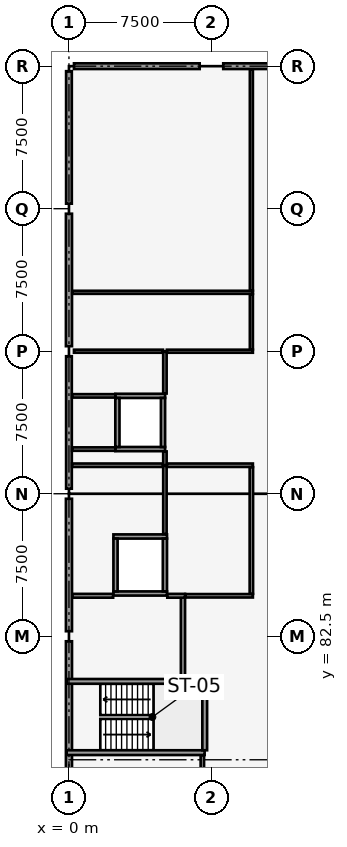
"""IFC4 building model, lengths in metres.
Left out: names, types, materials, properties, quantities, classifications, styles, units other than length and angle.
Written with IfcOpenShell. Run it as: python <this file> out.ifc"""

import sys

from ifc_helpers import new_model, si_unit, direction, frame, frame_2d, origin, origin_2d, place, context, subcontext, project, spatial, rectangle, extrude, element, fill, save


model = new_model("IFC4")
c1 = context("Model", 3, precision=1e-05, world=origin(), true_north=direction((0.0, 1.0)))
c2 = subcontext(c1, "Body", "Model", "MODEL_VIEW")
j1 = project(units=[si_unit("LENGTHUNIT", "METRE"), si_unit("PLANEANGLEUNIT", "RADIAN")], contexts=[c1])
p1 = place(None, origin())
s1 = spatial("IfcSite", under=j1, at=p1, CompositionType="ELEMENT")
p2 = place(p1, origin())
s2 = spatial("IfcBuilding", under=s1, at=p2, CompositionType="ELEMENT")
p3 = place(p2, frame((0.0, 0.0, 17.1)))
s3 = spatial("IfcBuildingStorey", under=s2, at=p3, CompositionType="ELEMENT", Elevation=17.1)
for number, where, z_axis, x_axis in (
    (1, (0.0, 82.5, 0.0), (0.0, 0.0, 1.0), (1.0, 0.0, 0.0)),
    (2, (0.0, 90.0, 0.0), (0.0, 0.0, 1.0), (1.0, 0.0, 0.0)),
    (3, (0.0, 97.5, 0.0), (0.0, 0.0, 1.0), (1.0, 0.0, 0.0)),
    (4, (0.0, 105.0, 0.0), (0.0, 0.0, 1.0), (1.0, 0.0, 0.0)),
    (5, (0.0, 112.5, 0.0), (0.0, 0.0, 1.0), (1.0, 0.0, 0.0)),
):
    element("IfcColumn", number, at=place(p3, frame(where, z_axis=z_axis, x_axis=x_axis)), inside=s3, PredefinedType="COLUMN", context=c2, shape_type="SweptSolid", body=[
        extrude(rectangle(XDim=0.5, YDim=0.5, at=origin_2d()), origin(), (0.0, 0.0, 1.0), 3.9),
    ])
p4 = place(p3, frame((0.265, 112.5, 0.0), z_axis=(0.0, 0.0, 1.0), x_axis=(1.0, 0.0, 0.0)))
e6 = element("IfcWall", 6, at=p4, inside=s3, PredefinedType="SOLIDWALL", context=c2, shape_type="SweptSolid", body=[
    extrude(rectangle(XDim=6.615, YDim=0.3, at=frame_2d((3.308, 0.0))), origin(), (0.0, 0.0, 1.0), 2.59),
])
p5 = place(p4, frame((2.91, 0.0, 0.6)))
e7 = element("IfcOpeningElement", 7, at=p5, cuts=e6, PredefinedType="OPENING", context=c2, shape_type="SweptSolid", body=[
    extrude(rectangle(XDim=1.15, YDim=1.3, at=frame_2d((0.575, 0.65))), frame((0.0, 0.16, 0.0), z_axis=(0.0, -1.0, 0.0), x_axis=(1.0, 0.0, 0.0)), (0.0, 0.0, 1.0), 0.32),
])
p6 = place(p3, frame((8.12, 112.5, 0.0), z_axis=(0.0, 0.0, 1.0), x_axis=(1.0, 0.0, 0.0)))
e8 = element("IfcWall", 8, at=p6, inside=s3, PredefinedType="SOLIDWALL", context=c2, shape_type="SweptSolid", body=[
    extrude(rectangle(XDim=6.615, YDim=0.3, at=frame_2d((3.308, 0.0))), origin(), (0.0, 0.0, 1.0), 2.59),
])
p7 = place(p6, frame((2.48, 0.0, 0.6)))
e9 = element("IfcOpeningElement", 9, at=p7, cuts=e8, PredefinedType="OPENING", context=c2, shape_type="SweptSolid", body=[
    extrude(rectangle(XDim=1.3, YDim=1.3, at=frame_2d((0.65, 0.65))), frame((0.0, 0.16, 0.0), z_axis=(0.0, -1.0, 0.0), x_axis=(1.0, 0.0, 0.0)), (0.0, 0.0, 1.0), 0.32),
])
for number, where, z_axis, x_axis in (
    (10, (0.0, 75.265, 0.0), (0.0, 0.0, 1.0), (0.0, 1.0, 0.0)),
    (11, (0.0, 82.765, 0.0), (0.0, 0.0, 1.0), (0.0, 1.0, 0.0)),
):
    element("IfcWall", number, at=place(p3, frame(where, z_axis=z_axis, x_axis=x_axis)), inside=s3, PredefinedType="SOLIDWALL", context=c2, shape_type="SweptSolid", body=[
        extrude(rectangle(XDim=6.97, YDim=0.32, at=frame_2d((3.485, 0.0))), origin(), (0.0, 0.0, 1.0), 2.59),
    ])
p8 = place(p3, frame((0.0, 90.265, 0.0), z_axis=(0.0, 0.0, 1.0), x_axis=(0.0, 1.0, 0.0)))
e12 = element("IfcWall", 12, at=p8, inside=s3, PredefinedType="SOLIDWALL", context=c2, shape_type="SweptSolid", body=[
    extrude(rectangle(XDim=6.97, YDim=0.3, at=frame_2d((3.485, 0.0))), origin(), (0.0, 0.0, 1.0), 2.59),
])
p9 = place(p3, frame((0.0, 97.765, 0.0), z_axis=(0.0, 0.0, 1.0), x_axis=(0.0, 1.0, 0.0)))
e13 = element("IfcWall", 13, at=p9, inside=s3, PredefinedType="SOLIDWALL", context=c2, shape_type="SweptSolid", body=[
    extrude(rectangle(XDim=6.97, YDim=0.32, at=frame_2d((3.485, 0.0))), origin(), (0.0, 0.0, 1.0), 2.59),
])
p10 = place(p3, frame((0.0, 105.265, 0.0), z_axis=(0.0, 0.0, 1.0), x_axis=(0.0, 1.0, 0.0)))
e14 = element("IfcWall", 14, at=p10, inside=s3, PredefinedType="SOLIDWALL", context=c2, shape_type="SweptSolid", body=[
    extrude(rectangle(XDim=6.97, YDim=0.3, at=frame_2d((3.485, 0.0))), origin(), (0.0, 0.0, 1.0), 2.59),
])
p11 = place(p10, frame((1.32, 0.0, 0.6)))
e15 = element("IfcOpeningElement", 15, at=p11, cuts=e14, PredefinedType="OPENING", context=c2, shape_type="SweptSolid", body=[
    extrude(rectangle(XDim=1.2, YDim=1.2, at=frame_2d((0.6, 0.6))), frame((0.0, 0.16, 0.0), z_axis=(0.0, -1.0, 0.0), x_axis=(1.0, 0.0, 0.0)), (0.0, 0.0, 1.0), 0.32),
])
p12 = place(p10, frame((4.375, 0.0, 0.6)))
e16 = element("IfcOpeningElement", 16, at=p12, cuts=e14, PredefinedType="OPENING", context=c2, shape_type="SweptSolid", body=[
    extrude(rectangle(XDim=1.35, YDim=1.15, at=frame_2d((0.675, 0.575))), frame((0.0, 0.16, 0.0), z_axis=(0.0, -1.0, 0.0), x_axis=(1.0, 0.0, 0.0)), (0.0, 0.0, 1.0), 0.32),
])
p13 = place(p3, frame((-0.12, 76.375, 0.0), z_axis=(0.0, 0.0, 1.0), x_axis=(1.0, 0.0, 0.0)))
e17 = element("IfcWall", 17, at=p13, inside=s3, PredefinedType="SOLIDWALL", context=c2, shape_type="SweptSolid", body=[
    extrude(rectangle(XDim=7.26, YDim=0.25, at=frame_2d((3.63, 0.0))), origin(), (0.0, 0.0, 1.0), 3.62),
])
p14 = place(p3, frame((-0.12, 80.125, 0.0), z_axis=(0.0, 0.0, 1.0), x_axis=(1.0, 0.0, 0.0)))
e18 = element("IfcWall", 18, at=p14, inside=s3, PredefinedType="SOLIDWALL", context=c2, shape_type="SweptSolid", body=[
    extrude(rectangle(XDim=7.26, YDim=0.25, at=frame_2d((3.63, 0.0))), origin(), (0.0, 0.0, 1.0), 3.62),
])
p15 = place(p14, frame((0.45, 0.0, 0.0)))
e19 = element("IfcOpeningElement", 19, at=p15, cuts=e18, PredefinedType="OPENING", context=c2, shape_type="SweptSolid", body=[
    extrude(rectangle(XDim=1.1, YDim=2.15, at=frame_2d((0.55, 1.075))), frame((0.0, 0.135, 0.0), z_axis=(0.0, -1.0, 0.0), x_axis=(1.0, 0.0, 0.0)), (0.0, 0.0, 1.0), 0.27),
])
p16 = place(p3, frame((7.145, 76.5, 0.0), z_axis=(0.0, 0.0, 1.0), x_axis=(0.0, 1.0, 0.0)))
e20 = element("IfcWall", 20, at=p16, inside=s3, PredefinedType="SOLIDWALL", context=c2, shape_type="SweptSolid", body=[
    extrude(rectangle(XDim=3.5, YDim=0.25, at=frame_2d((1.75, 0.0))), origin(), (0.0, 0.0, 1.0), 3.62),
])
for number, where, z_axis, x_axis in (
    (21, (2.44, 92.35, 0.0), (0.0, 0.0, 1.0), (1.0, 0.0, 0.0)),
    (22, (2.44, 95.15, 0.0), (0.0, 0.0, 1.0), (1.0, 0.0, 0.0)),
):
    element("IfcWall", number, at=place(p3, frame(where, z_axis=z_axis, x_axis=x_axis)), inside=s3, PredefinedType="SOLIDWALL", context=c2, shape_type="SweptSolid", body=[
        extrude(rectangle(XDim=2.62, YDim=0.22, at=frame_2d((1.31, 0.0))), origin(), (0.0, 0.0, 1.0), 3.62),
    ])
p17 = place(p3, frame((2.55, 92.46, 0.0), z_axis=(0.0, 0.0, 1.0), x_axis=(0.0, 1.0, 0.0)))
e23 = element("IfcWall", 23, at=p17, inside=s3, PredefinedType="SOLIDWALL", context=c2, shape_type="SweptSolid", body=[
    extrude(rectangle(XDim=2.58, YDim=0.22, at=frame_2d((1.29, 0.0))), origin(), (0.0, 0.0, 1.0), 3.62),
])
p18 = place(p3, frame((4.95, 92.46, 0.0), z_axis=(0.0, 0.0, 1.0), x_axis=(0.0, 1.0, 0.0)))
e24 = element("IfcWall", 24, at=p18, inside=s3, PredefinedType="SOLIDWALL", context=c2, shape_type="SweptSolid", body=[
    extrude(rectangle(XDim=2.58, YDim=0.22, at=frame_2d((1.29, 0.0))), origin(), (0.0, 0.0, 1.0), 3.62),
])
p19 = place(p18, frame((0.79, 0.0, 0.0)))
e25 = element("IfcOpeningElement", 25, at=p19, cuts=e24, PredefinedType="OPENING", context=c2, shape_type="SweptSolid", body=[
    extrude(rectangle(XDim=1.0, YDim=2.15, at=frame_2d((0.5, 1.075))), frame((0.0, 0.12, 0.0), z_axis=(0.0, -1.0, 0.0), x_axis=(1.0, 0.0, 0.0)), (0.0, 0.0, 1.0), 0.24),
])
p20 = place(p3, frame((2.34, 84.75, 0.0), z_axis=(0.0, 0.0, 1.0), x_axis=(1.0, 0.0, 0.0)))
e26 = element("IfcWall", 26, at=p20, inside=s3, PredefinedType="SOLIDWALL", context=c2, shape_type="SweptSolid", body=[
    extrude(rectangle(XDim=2.82, YDim=0.22, at=frame_2d((1.41, 0.0))), origin(), (0.0, 0.0, 1.0), 3.62),
])
p21 = place(p20, frame((0.86, 0.0, 0.0)))
e27 = element("IfcOpeningElement", 27, at=p21, cuts=e26, PredefinedType="OPENING", context=c2, shape_type="SweptSolid", body=[
    extrude(rectangle(XDim=1.1, YDim=2.15, at=frame_2d((0.55, 1.075))), frame((0.0, 0.12, 0.0), z_axis=(0.0, -1.0, 0.0), x_axis=(1.0, 0.0, 0.0)), (0.0, 0.0, 1.0), 0.24),
])
p22 = place(p3, frame((2.34, 87.75, 0.0), z_axis=(0.0, 0.0, 1.0), x_axis=(1.0, 0.0, 0.0)))
e28 = element("IfcWall", 28, at=p22, inside=s3, PredefinedType="SOLIDWALL", context=c2, shape_type="SweptSolid", body=[
    extrude(rectangle(XDim=2.82, YDim=0.22, at=frame_2d((1.41, 0.0))), origin(), (0.0, 0.0, 1.0), 3.62),
])
for number, where, z_axis, x_axis in (
    (29, (2.45, 84.86, 0.0), (0.0, 0.0, 1.0), (0.0, 1.0, 0.0)),
    (30, (5.05, 84.86, 0.0), (0.0, 0.0, 1.0), (0.0, 1.0, 0.0)),
):
    element("IfcWall", number, at=place(p3, frame(where, z_axis=z_axis, x_axis=x_axis)), inside=s3, PredefinedType="SOLIDWALL", context=c2, shape_type="SweptSolid", body=[
        extrude(rectangle(XDim=2.78, YDim=0.22, at=frame_2d((1.39, 0.0))), origin(), (0.0, 0.0, 1.0), 3.62),
    ])
p23 = place(p3, frame((6.0, 80.26, 0.0), z_axis=(0.0, 0.0, 1.0), x_axis=(0.0, 1.0, 0.0)))
e31 = element("IfcWall", 31, at=p23, inside=s3, PredefinedType="SOLIDWALL", context=c2, shape_type="SweptSolid", body=[
    extrude(rectangle(XDim=4.37, YDim=0.22, at=frame_2d((2.185, 0.0))), origin(), (0.0, 0.0, 1.0), 3.62),
])
p24 = place(p23, frame((0.45, 0.0, 0.0)))
e32 = element("IfcOpeningElement", 32, at=p24, cuts=e31, PredefinedType="OPENING", context=c2, shape_type="SweptSolid", body=[
    extrude(rectangle(XDim=1.1, YDim=2.15, at=frame_2d((0.55, 1.075))), frame((0.0, 0.12, 0.0), z_axis=(0.0, -1.0, 0.0), x_axis=(1.0, 0.0, 0.0)), (0.0, 0.0, 1.0), 0.24),
])
p25 = place(p3, frame((0.18, 84.63, 0.0), z_axis=(0.0, 0.0, 1.0), x_axis=(1.0, 0.0, 0.0)))
e33 = element("IfcWall", 33, at=p25, inside=s3, PredefinedType="PARTITIONING", context=c2, shape_type="SweptSolid", body=[
    extrude(rectangle(XDim=2.145, YDim=0.2, at=frame_2d((1.073, 0.0))), origin(), (0.0, 0.0, 1.0), 2.85),
])
p26 = place(p3, frame((5.175, 84.63, 0.0), z_axis=(0.0, 0.0, 1.0), x_axis=(1.0, 0.0, 0.0)))
e34 = element("IfcWall", 34, at=p26, inside=s3, PredefinedType="PARTITIONING", context=c2, shape_type="SweptSolid", body=[
    extrude(rectangle(XDim=0.935, YDim=0.2, at=frame_2d((0.468, 0.0))), origin(), (0.0, 0.0, 1.0), 3.2),
])
p27 = place(p3, frame((7.02, 75.0, 0.0), z_axis=(0.0, 0.0, 1.0), x_axis=(0.0, 1.0, 0.0)))
e35 = element("IfcWall", 35, at=p27, inside=s3, PredefinedType="PARTITIONING", context=c2, shape_type="SweptSolid", body=[
    extrude(rectangle(XDim=1.236, YDim=0.18, at=frame_2d((0.618, 0.0))), origin(), (0.0, 0.0, 1.0), 2.59),
])
p28 = place(p3, frame((5.05, 87.874, 0.0), z_axis=(0.0, 0.0, 1.0), x_axis=(0.0, 1.0, 0.0)))
e36 = element("IfcWall", 36, at=p28, inside=s3, PredefinedType="PARTITIONING", context=c2, shape_type="SweptSolid", body=[
    extrude(rectangle(XDim=3.626, YDim=0.18, at=frame_2d((1.813, 0.0))), origin(), (0.0, 0.0, 1.0), 2.59),
])
p29 = place(p3, frame((6.124, 84.63, 0.0), z_axis=(0.0, 0.0, 1.0), x_axis=(1.0, 0.0, 0.0)))
e37 = element("IfcWall", 37, at=p29, inside=s3, PredefinedType="PARTITIONING", context=c2, shape_type="SweptSolid", body=[
    extrude(rectangle(XDim=3.556, YDim=0.18, at=frame_2d((1.778, 0.0))), origin(), (0.0, 0.0, 1.0), 2.97),
])
p30 = place(p3, frame((0.164, 91.5, 0.0), z_axis=(0.0, 0.0, 1.0), x_axis=(1.0, 0.0, 0.0)))
e38 = element("IfcWall", 38, at=p30, inside=s3, PredefinedType="PARTITIONING", context=c2, shape_type="SweptSolid", body=[
    extrude(rectangle(XDim=4.782, YDim=0.18, at=frame_2d((2.391, 0.0))), origin(), (0.0, 0.0, 1.0), 2.84),
])
p31 = place(p3, frame((5.154, 91.5, 0.0), z_axis=(0.0, 0.0, 1.0), x_axis=(1.0, 0.0, 0.0)))
e39 = element("IfcWall", 39, at=p31, inside=s3, PredefinedType="PARTITIONING", context=c2, shape_type="SweptSolid", body=[
    extrude(rectangle(XDim=4.526, YDim=0.18, at=frame_2d((2.263, 0.0))), origin(), (0.0, 0.0, 1.0), 2.97),
])
p32 = place(p3, frame((9.6, 84.734, 0.0), z_axis=(0.0, 0.0, 1.0), x_axis=(0.0, 1.0, 0.0)))
e40 = element("IfcWall", 40, at=p32, inside=s3, PredefinedType="PARTITIONING", context=c2, shape_type="SweptSolid", body=[
    extrude(rectangle(XDim=6.662, YDim=0.18, at=frame_2d((3.331, 0.0))), origin(), (0.0, 0.0, 1.0), 2.59),
])
p33 = place(p32, frame((2.241, 0.0, 0.0)))
e41 = element("IfcOpeningElement", 41, at=p33, cuts=e40, PredefinedType="OPENING", context=c2, shape_type="SweptSolid", body=[
    extrude(rectangle(XDim=1.05, YDim=2.12, at=frame_2d((0.525, 1.06))), frame((0.0, 0.1, 0.0), z_axis=(0.0, -1.0, 0.0), x_axis=(1.0, 0.0, 0.0)), (0.0, 0.0, 1.0), 0.2),
])
for number, where, z_axis, x_axis in (
    (42, (0.164, 92.35, 0.0), (0.0, 0.0, 1.0), (1.0, 0.0, 0.0)),
    (43, (0.164, 95.15, 0.0), (0.0, 0.0, 1.0), (1.0, 0.0, 0.0)),
):
    element("IfcWall", number, at=place(p3, frame(where, z_axis=z_axis, x_axis=x_axis)), inside=s3, PredefinedType="PARTITIONING", context=c2, shape_type="SweptSolid", body=[
        extrude(rectangle(XDim=2.276, YDim=0.18, at=frame_2d((1.138, 0.0))), origin(), (0.0, 0.0, 1.0), 2.84),
    ])
p34 = place(p3, frame((5.05, 91.5, 0.0), z_axis=(0.0, 0.0, 1.0), x_axis=(0.0, 1.0, 0.0)))
e44 = element("IfcWall", 44, at=p34, inside=s3, PredefinedType="PARTITIONING", context=c2, shape_type="SweptSolid", body=[
    extrude(rectangle(XDim=0.726, YDim=0.18, at=frame_2d((0.363, 0.0))), origin(), (0.0, 0.0, 1.0), 2.97),
])
p35 = place(p3, frame((5.05, 95.274, 0.0), z_axis=(0.0, 0.0, 1.0), x_axis=(0.0, 1.0, 0.0)))
e45 = element("IfcWall", 45, at=p35, inside=s3, PredefinedType="PARTITIONING", context=c2, shape_type="SweptSolid", body=[
    extrude(rectangle(XDim=2.226, YDim=0.18, at=frame_2d((1.113, 0.0))), origin(), (0.0, 0.0, 1.0), 2.59),
])
p36 = place(p3, frame((0.264, 97.5, 0.0), z_axis=(0.0, 0.0, 1.0), x_axis=(1.0, 0.0, 0.0)))
e46 = element("IfcWall", 46, at=p36, inside=s3, PredefinedType="PARTITIONING", context=c2, shape_type="SweptSolid", body=[
    extrude(rectangle(XDim=4.682, YDim=0.16, at=frame_2d((2.341, 0.0))), origin(), (0.0, 0.0, 1.0), 2.59),
])
p37 = place(p3, frame((5.154, 97.5, 0.0), z_axis=(0.0, 0.0, 1.0), x_axis=(1.0, 0.0, 0.0)))
e47 = element("IfcWall", 47, at=p37, inside=s3, PredefinedType="PARTITIONING", context=c2, shape_type="SweptSolid", body=[
    extrude(rectangle(XDim=4.526, YDim=0.16, at=frame_2d((2.263, 0.0))), origin(), (0.0, 0.0, 1.0), 2.59),
])
p38 = place(p3, frame((0.174, 100.6, 0.0), z_axis=(0.0, 0.0, 1.0), x_axis=(1.0, 0.0, 0.0)))
e48 = element("IfcWall", 48, at=p38, inside=s3, PredefinedType="PARTITIONING", context=c2, shape_type="SweptSolid", body=[
    extrude(rectangle(XDim=9.506, YDim=0.16, at=frame_2d((4.753, 0.0))), origin(), (0.0, 0.0, 1.0), 2.97),
])
p39 = place(p3, frame((9.6, 97.594, 0.0), z_axis=(0.0, 0.0, 1.0), x_axis=(0.0, 1.0, 0.0)))
e49 = element("IfcWall", 49, at=p39, inside=s3, PredefinedType="PARTITIONING", context=c2, shape_type="SweptSolid", body=[
    extrude(rectangle(XDim=2.912, YDim=0.16, at=frame_2d((1.456, 0.0))), origin(), (0.0, 0.0, 1.0), 2.59),
])
p40 = place(p39, frame((0.981, 0.0, 0.0)))
e50 = element("IfcOpeningElement", 50, at=p40, cuts=e49, PredefinedType="OPENING", context=c2, shape_type="SweptSolid", body=[
    extrude(rectangle(XDim=0.95, YDim=2.1, at=frame_2d((0.475, 1.05))), frame((0.0, 0.09, 0.0), z_axis=(0.0, -1.0, 0.0), x_axis=(1.0, 0.0, 0.0)), (0.0, 0.0, 1.0), 0.18),
])
p41 = place(p3, frame((9.6, 100.694, 0.0), z_axis=(0.0, 0.0, 1.0), x_axis=(0.0, 1.0, 0.0)))
e51 = element("IfcWall", 51, at=p41, inside=s3, PredefinedType="PARTITIONING", context=c2, shape_type="SweptSolid", body=[
    extrude(rectangle(XDim=11.642, YDim=0.16, at=frame_2d((5.821, 0.0))), origin(), (0.0, 0.0, 1.0), 2.59),
])
p42 = place(p41, frame((5.281, 0.0, 0.0)))
e52 = element("IfcOpeningElement", 52, at=p42, cuts=e51, PredefinedType="OPENING", context=c2, shape_type="SweptSolid", body=[
    extrude(rectangle(XDim=1.05, YDim=2.12, at=frame_2d((0.525, 1.06))), frame((0.0, 0.09, 0.0), z_axis=(0.0, -1.0, 0.0), x_axis=(1.0, 0.0, 0.0)), (0.0, 0.0, 1.0), 0.18),
])
p43 = place(p5, origin())
e53 = element("IfcWindow", 53, at=p43, inside=s3, PartitioningType="SINGLE_PANEL", PredefinedType="WINDOW", context=c2, shape_type="SweptSolid", body=[
    extrude(rectangle(XDim=1.15, YDim=1.3, at=frame_2d((0.575, 0.65))), frame((0.0, 0.03, 0.0), z_axis=(0.0, -1.0, 0.0), x_axis=(1.0, 0.0, 0.0)), (0.0, 0.0, 1.0), 0.06),
])
fill(e7, e53)
p44 = place(p11, origin())
e54 = element("IfcWindow", 54, at=p44, inside=s3, PartitioningType="SINGLE_PANEL", PredefinedType="WINDOW", context=c2, shape_type="SweptSolid", body=[
    extrude(rectangle(XDim=1.2, YDim=1.2, at=frame_2d((0.6, 0.6))), frame((0.0, 0.03, 0.0), z_axis=(0.0, -1.0, 0.0), x_axis=(1.0, 0.0, 0.0)), (0.0, 0.0, 1.0), 0.06),
])
fill(e15, e54)
p45 = place(p12, origin())
e55 = element("IfcWindow", 55, at=p45, inside=s3, PartitioningType="SINGLE_PANEL", PredefinedType="WINDOW", context=c2, shape_type="SweptSolid", body=[
    extrude(rectangle(XDim=1.35, YDim=1.15, at=frame_2d((0.675, 0.575))), frame((0.0, 0.03, 0.0), z_axis=(0.0, -1.0, 0.0), x_axis=(1.0, 0.0, 0.0)), (0.0, 0.0, 1.0), 0.06),
])
fill(e16, e55)
p46 = place(p15, origin())
e56 = element("IfcDoor", 56, at=p46, inside=s3, OperationType="SINGLE_SWING_RIGHT", PredefinedType="DOOR", context=c2, shape_type="SweptSolid", body=[
    extrude(rectangle(XDim=1.1, YDim=2.15, at=frame_2d((0.55, 1.075))), frame((0.0, 0.025, 0.0), z_axis=(0.0, -1.0, 0.0), x_axis=(1.0, 0.0, 0.0)), (0.0, 0.0, 1.0), 0.05),
])
fill(e19, e56)
p47 = place(p19, origin())
e57 = element("IfcDoor", 57, at=p47, inside=s3, OperationType="SLIDING_TO_LEFT", PredefinedType="DOOR", context=c2, shape_type="SweptSolid", body=[
    extrude(rectangle(XDim=1.0, YDim=2.15, at=frame_2d((0.5, 1.075))), frame((0.0, 0.025, 0.0), z_axis=(0.0, -1.0, 0.0), x_axis=(1.0, 0.0, 0.0)), (0.0, 0.0, 1.0), 0.05),
])
fill(e25, e57)
p48 = place(p21, origin())
e58 = element("IfcDoor", 58, at=p48, inside=s3, OperationType="SLIDING_TO_LEFT", PredefinedType="DOOR", context=c2, shape_type="SweptSolid", body=[
    extrude(rectangle(XDim=1.1, YDim=2.15, at=frame_2d((0.55, 1.075))), frame((0.0, 0.025, 0.0), z_axis=(0.0, -1.0, 0.0), x_axis=(1.0, 0.0, 0.0)), (0.0, 0.0, 1.0), 0.05),
])
fill(e27, e58)
p49 = place(p24, origin())
e59 = element("IfcDoor", 59, at=p49, inside=s3, OperationType="SINGLE_SWING_LEFT", PredefinedType="DOOR", context=c2, shape_type="SweptSolid", body=[
    extrude(rectangle(XDim=1.1, YDim=2.15, at=frame_2d((0.55, 1.075))), frame((0.0, 0.025, 0.0), z_axis=(0.0, -1.0, 0.0), x_axis=(1.0, 0.0, 0.0)), (0.0, 0.0, 1.0), 0.05),
])
fill(e32, e59)
p50 = place(p33, origin())
e60 = element("IfcDoor", 60, at=p50, inside=s3, OperationType="SINGLE_SWING_LEFT", PredefinedType="DOOR", context=c2, shape_type="SweptSolid", body=[
    extrude(rectangle(XDim=1.05, YDim=2.12, at=frame_2d((0.525, 1.06))), frame((0.0, 0.025, 0.0), z_axis=(0.0, -1.0, 0.0), x_axis=(1.0, 0.0, 0.0)), (0.0, 0.0, 1.0), 0.05),
])
fill(e41, e60)
p51 = place(p40, origin())
e61 = element("IfcDoor", 61, at=p51, inside=s3, OperationType="SINGLE_SWING_RIGHT", PredefinedType="DOOR", context=c2, shape_type="SweptSolid", body=[
    extrude(rectangle(XDim=0.95, YDim=2.1, at=frame_2d((0.475, 1.05))), frame((0.0, 0.025, 0.0), z_axis=(0.0, -1.0, 0.0), x_axis=(1.0, 0.0, 0.0)), (0.0, 0.0, 1.0), 0.05),
])
fill(e50, e61)
p52 = place(p42, origin())
e62 = element("IfcDoor", 62, at=p52, inside=s3, OperationType="SINGLE_SWING_LEFT", PredefinedType="DOOR", context=c2, shape_type="SweptSolid", body=[
    extrude(rectangle(XDim=1.05, YDim=2.12, at=frame_2d((0.525, 1.06))), frame((0.0, 0.025, 0.0), z_axis=(0.0, -1.0, 0.0), x_axis=(1.0, 0.0, 0.0)), (0.0, 0.0, 1.0), 0.05),
])
fill(e52, e62)
save(model, sys.argv[1])
